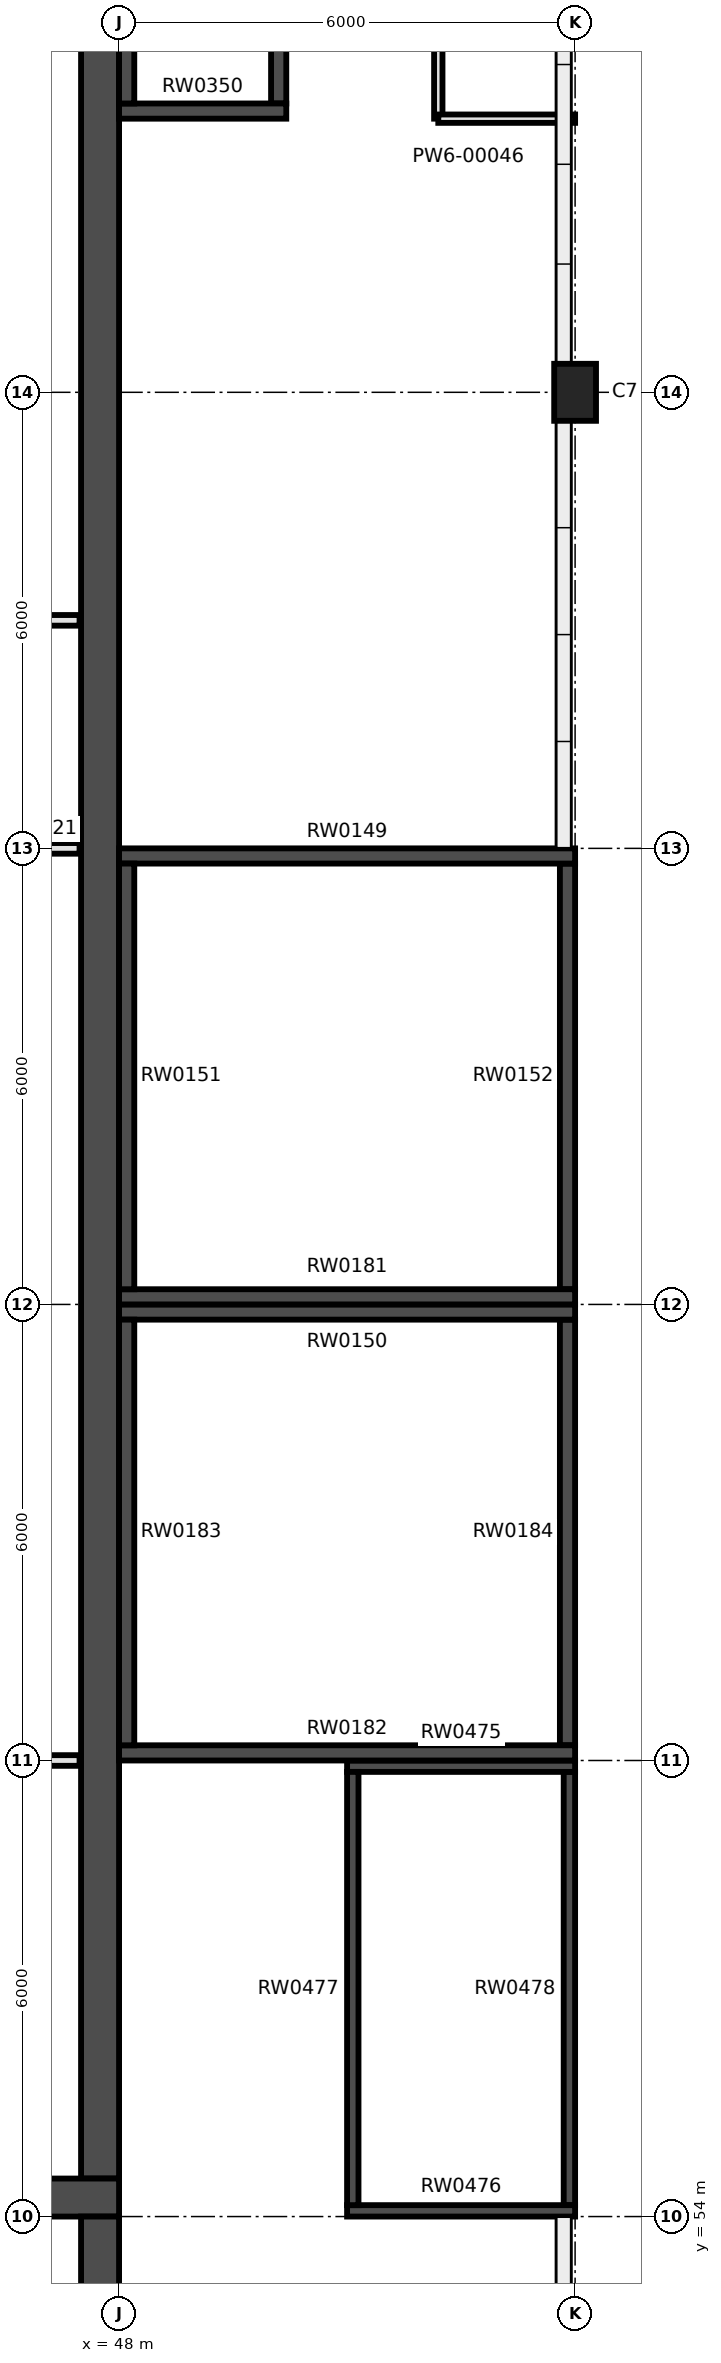
"""IFC4 building model, lengths in metres.
Left out: names, types, materials, properties, quantities, classifications, styles, units other than length and angle.
Written with IfcOpenShell. Run it as: python <this file> out.ifc"""

import sys

from ifc_helpers import new_model, si_unit, direction, frame, frame_2d, origin, origin_2d, place, context, subcontext, project, spatial, rectangle, extrude, element, fill, save


model = new_model("IFC4")
c1 = context("Model", 3, precision=1e-05, world=origin(), true_north=direction((0.0, 1.0)))
c2 = subcontext(c1, "Body", "Model", "MODEL_VIEW")
j1 = project(units=[si_unit("LENGTHUNIT", "METRE"), si_unit("PLANEANGLEUNIT", "RADIAN")], contexts=[c1])
p1 = place(None, origin())
s1 = spatial("IfcSite", under=j1, at=p1, CompositionType="ELEMENT")
p2 = place(p1, origin())
s2 = spatial("IfcBuilding", under=s1, at=p2, CompositionType="ELEMENT")
p3 = place(p2, origin())
s3 = spatial("IfcBuildingStorey", under=s2, at=p3, CompositionType="ELEMENT", Elevation=0.0)
p4 = place(p3, frame((54.0, 78.0, -0.3), z_axis=(0.0, 0.0, 1.0), x_axis=(1.0, 0.0, 0.0)))
e1 = element("IfcColumn", 1, at=p4, inside=s3, PredefinedType="COLUMN", context=c2, shape_type="SweptSolid", body=[
    extrude(rectangle(XDim=0.55, YDim=0.75, at=origin_2d()), origin(), (0.0, 0.0, 1.0), 7.3),
])
p5 = place(p3, frame((48.0, 71.9, -0.3), z_axis=(0.0, 0.0, 1.0), x_axis=(1.0, 0.0, 0.0)))
e2 = element("IfcWall", 2, at=p5, inside=s3, PredefinedType="SHEAR", context=c2, shape_type="SweptSolid", body=[
    extrude(rectangle(XDim=6.0, YDim=0.2, at=frame_2d((3.0, 0.0))), origin(), (0.0, 0.0, 1.0), 7.3),
])
p6 = place(p5, frame((4.6, 0.0, 0.3)))
e3 = element("IfcOpeningElement", 3, at=p6, cuts=e2, PredefinedType="OPENING", context=c2, shape_type="SweptSolid", body=[
    extrude(rectangle(XDim=1.1, YDim=2.2, at=frame_2d((0.55, 1.1))), frame((0.0, 0.11, 0.0), z_axis=(0.0, -1.0, 0.0), x_axis=(1.0, 0.0, 0.0)), (0.0, 0.0, 1.0), 0.22),
])
p7 = place(p3, frame((48.0, 66.1, -0.3), z_axis=(0.0, 0.0, 1.0), x_axis=(1.0, 0.0, 0.0)))
e4 = element("IfcWall", 4, at=p7, inside=s3, PredefinedType="SHEAR", context=c2, shape_type="SweptSolid", body=[
    extrude(rectangle(XDim=6.0, YDim=0.2, at=frame_2d((3.0, 0.0))), origin(), (0.0, 0.0, 1.0), 7.3),
])
p8 = place(p3, frame((48.1, 66.2, -0.3), z_axis=(0.0, 0.0, 1.0), x_axis=(0.0, 1.0, 0.0)))
e5 = element("IfcWall", 5, at=p8, inside=s3, PredefinedType="SHEAR", context=c2, shape_type="SweptSolid", body=[
    extrude(rectangle(XDim=5.6, YDim=0.2, at=frame_2d((2.8, 0.0))), origin(), (0.0, 0.0, 1.0), 7.3),
])
p9 = place(p3, frame((53.9, 66.2, -0.3), z_axis=(0.0, 0.0, 1.0), x_axis=(0.0, 1.0, 0.0)))
e6 = element("IfcWall", 6, at=p9, inside=s3, PredefinedType="SHEAR", context=c2, shape_type="SweptSolid", body=[
    extrude(rectangle(XDim=5.6, YDim=0.2, at=frame_2d((2.8, 0.0))), origin(), (0.0, 0.0, 1.0), 7.3),
])
p10 = place(p9, frame((1.9, 0.0, 0.3)))
e7 = element("IfcOpeningElement", 7, at=p10, cuts=e6, PredefinedType="OPENING", context=c2, shape_type="SweptSolid", body=[
    extrude(rectangle(XDim=1.8, YDim=2.4, at=frame_2d((0.9, 1.2))), frame((0.0, 0.11, 0.0), z_axis=(0.0, -1.0, 0.0), x_axis=(1.0, 0.0, 0.0)), (0.0, 0.0, 1.0), 0.22),
])
p11 = place(p3, frame((48.0, 65.9, -0.3), z_axis=(0.0, 0.0, 1.0), x_axis=(1.0, 0.0, 0.0)))
e8 = element("IfcWall", 8, at=p11, inside=s3, PredefinedType="SHEAR", context=c2, shape_type="SweptSolid", body=[
    extrude(rectangle(XDim=6.0, YDim=0.2, at=frame_2d((3.0, 0.0))), origin(), (0.0, 0.0, 1.0), 7.3),
])
p12 = place(p3, frame((48.0, 60.1, -0.3), z_axis=(0.0, 0.0, 1.0), x_axis=(1.0, 0.0, 0.0)))
e9 = element("IfcWall", 9, at=p12, inside=s3, PredefinedType="SHEAR", context=c2, shape_type="SweptSolid", body=[
    extrude(rectangle(XDim=6.0, YDim=0.2, at=frame_2d((3.0, 0.0))), origin(), (0.0, 0.0, 1.0), 7.3),
])
p13 = place(p12, frame((0.825, 0.0, 0.3)))
e10 = element("IfcOpeningElement", 10, at=p13, cuts=e9, PredefinedType="OPENING", context=c2, shape_type="SweptSolid", body=[
    extrude(rectangle(XDim=1.8, YDim=2.2, at=frame_2d((0.9, 1.1))), frame((0.0, 0.11, 0.0), z_axis=(0.0, -1.0, 0.0), x_axis=(1.0, 0.0, 0.0)), (0.0, 0.0, 1.0), 0.22),
])
p14 = place(p3, frame((48.1, 60.2, -0.3), z_axis=(0.0, 0.0, 1.0), x_axis=(0.0, 1.0, 0.0)))
e11 = element("IfcWall", 11, at=p14, inside=s3, PredefinedType="SHEAR", context=c2, shape_type="SweptSolid", body=[
    extrude(rectangle(XDim=5.6, YDim=0.2, at=frame_2d((2.8, 0.0))), origin(), (0.0, 0.0, 1.0), 7.3),
])
p15 = place(p3, frame((53.9, 60.2, -0.3), z_axis=(0.0, 0.0, 1.0), x_axis=(0.0, 1.0, 0.0)))
e12 = element("IfcWall", 12, at=p15, inside=s3, PredefinedType="SHEAR", context=c2, shape_type="SweptSolid", body=[
    extrude(rectangle(XDim=5.6, YDim=0.2, at=frame_2d((2.8, 0.0))), origin(), (0.0, 0.0, 1.0), 7.3),
])
p16 = place(p15, frame((0.125, 0.0, 0.3)))
e13 = element("IfcOpeningElement", 13, at=p16, cuts=e12, PredefinedType="OPENING", context=c2, shape_type="SweptSolid", body=[
    extrude(rectangle(XDim=1.8, YDim=2.4, at=frame_2d((0.9, 1.2))), frame((0.0, 0.11, 0.0), z_axis=(0.0, -1.0, 0.0), x_axis=(1.0, 0.0, 0.0)), (0.0, 0.0, 1.0), 0.22),
])
p17 = place(p3, frame((48.0, 81.7, -1.4), z_axis=(0.0, 0.0, 1.0), x_axis=(1.0, 0.0, 0.0)))
e14 = element("IfcWall", 14, at=p17, inside=s3, PredefinedType="SHEAR", context=c2, shape_type="SweptSolid", body=[
    extrude(rectangle(XDim=2.2, YDim=0.2, at=frame_2d((1.1, 0.0))), origin(), (0.0, 0.0, 1.0), 8.4),
])
p18 = place(p17, frame((0.55, 0.0, 1.4)))
e15 = element("IfcOpeningElement", 15, at=p18, cuts=e14, PredefinedType="OPENING", context=c2, shape_type="SweptSolid", body=[
    extrude(rectangle(XDim=1.1, YDim=2.1, at=frame_2d((0.55, 1.05))), frame((0.0, 0.11, 0.0), z_axis=(0.0, -1.0, 0.0), x_axis=(1.0, 0.0, 0.0)), (0.0, 0.0, 1.0), 0.22),
])
for number, where, z_axis, x_axis in (
    (16, (48.1, 81.8, -1.4), (0.0, 0.0, 1.0), (0.0, 1.0, 0.0)),
    (17, (50.1, 81.8, -1.4), (0.0, 0.0, 1.0), (0.0, 1.0, 0.0)),
):
    element("IfcWall", number, at=place(p3, frame(where, z_axis=z_axis, x_axis=x_axis)), inside=s3, PredefinedType="SHEAR", context=c2, shape_type="SweptSolid", body=[
        extrude(rectangle(XDim=2.0, YDim=0.2, at=frame_2d((1.0, 0.0))), origin(), (0.0, 0.0, 1.0), 8.4),
    ])
for number, where, z_axis, x_axis in (
    (18, (51.0, 59.925, -0.3), (0.0, 0.0, 1.0), (1.0, 0.0, 0.0)),
    (19, (51.0, 54.075, -0.3), (0.0, 0.0, 1.0), (1.0, 0.0, 0.0)),
):
    element("IfcWall", number, at=place(p3, frame(where, z_axis=z_axis, x_axis=x_axis)), inside=s3, PredefinedType="SHEAR", context=c2, shape_type="SweptSolid", body=[
        extrude(rectangle(XDim=3.0, YDim=0.15, at=frame_2d((1.5, 0.0))), origin(), (0.0, 0.0, 1.0), 7.3),
    ])
p19 = place(p3, frame((51.075, 54.15, -0.3), z_axis=(0.0, 0.0, 1.0), x_axis=(0.0, 1.0, 0.0)))
e20 = element("IfcWall", 20, at=p19, inside=s3, PredefinedType="SHEAR", context=c2, shape_type="SweptSolid", body=[
    extrude(rectangle(XDim=5.7, YDim=0.15, at=frame_2d((2.85, 0.0))), origin(), (0.0, 0.0, 1.0), 7.3),
])
p20 = place(p19, frame((2.5, 0.0, 0.3)))
e21 = element("IfcOpeningElement", 21, at=p20, cuts=e20, PredefinedType="OPENING", context=c2, shape_type="SweptSolid", body=[
    extrude(rectangle(XDim=0.6, YDim=2.04, at=frame_2d((0.3, 1.02))), frame((0.0, 0.085, 0.0), z_axis=(0.0, -1.0, 0.0), x_axis=(1.0, 0.0, 0.0)), (0.0, 0.0, 1.0), 0.17),
])
p21 = place(p3, frame((53.925, 54.15, -0.3), z_axis=(0.0, 0.0, 1.0), x_axis=(0.0, 1.0, 0.0)))
e22 = element("IfcWall", 22, at=p21, inside=s3, PredefinedType="SHEAR", context=c2, shape_type="SweptSolid", body=[
    extrude(rectangle(XDim=5.7, YDim=0.15, at=frame_2d((2.85, 0.0))), origin(), (0.0, 0.0, 1.0), 7.3),
])
p22 = place(p3, frame((47.75, 54.5, -0.3), z_axis=(0.0, 0.0, 1.0), x_axis=(0.0, 1.0, 0.0)))
e23 = element("IfcWall", 23, at=p22, inside=s3, PredefinedType="SHEAR", context=c2, shape_type="SweptSolid", body=[
    extrude(rectangle(XDim=35.5, YDim=0.5, at=frame_2d((17.75, 0.0))), origin(), (0.0, 0.0, 1.0), 7.3),
])
p23 = place(p22, frame((18.05, 0.0, 0.3)))
e24 = element("IfcOpeningElement", 24, at=p23, cuts=e23, PredefinedType="OPENING", context=c2, shape_type="SweptSolid", body=[
    extrude(rectangle(XDim=1.8, YDim=2.1, at=frame_2d((0.9, 1.05))), frame((0.0, 0.26, 0.0), z_axis=(0.0, -1.0, 0.0), x_axis=(1.0, 0.0, 0.0)), (0.0, 0.0, 1.0), 0.52),
])
p24 = place(p22, frame((3.6, 0.0, 0.3)))
e25 = element("IfcOpeningElement", 25, at=p24, cuts=e23, PredefinedType="OPENING", context=c2, shape_type="SweptSolid", body=[
    extrude(rectangle(XDim=1.0, YDim=2.1, at=frame_2d((0.5, 1.05))), frame((0.0, 0.26, 0.0), z_axis=(0.0, -1.0, 0.0), x_axis=(1.0, 0.0, 0.0)), (0.0, 0.0, 1.0), 0.52),
])
p25 = place(p3, frame((47.75, 30.0, -0.3), z_axis=(0.0, 0.0, 1.0), x_axis=(0.0, 1.0, 0.0)))
e26 = element("IfcWall", 26, at=p25, inside=s3, PredefinedType="SHEAR", context=c2, shape_type="SweptSolid", body=[
    extrude(rectangle(XDim=24.0, YDim=0.5, at=frame_2d((12.0, 0.0))), origin(), (0.0, 0.0, 1.0), 7.3),
])
p26 = place(p25, frame((2.25, 0.0, 0.3)))
e27 = element("IfcOpeningElement", 27, at=p26, cuts=e26, PredefinedType="OPENING", context=c2, shape_type="SweptSolid", body=[
    extrude(rectangle(XDim=1.5, YDim=2.1, at=frame_2d((0.75, 1.05))), frame((0.0, 0.26, 0.0), z_axis=(0.0, -1.0, 0.0), x_axis=(1.0, 0.0, 0.0)), (0.0, 0.0, 1.0), 0.52),
])
p27 = place(p25, frame((22.3, 0.0, 0.3)))
e28 = element("IfcOpeningElement", 28, at=p27, cuts=e26, PredefinedType="OPENING", context=c2, shape_type="SweptSolid", body=[
    extrude(rectangle(XDim=1.0, YDim=2.1, at=frame_2d((0.5, 1.05))), frame((0.0, 0.26, 0.0), z_axis=(0.0, -1.0, 0.0), x_axis=(1.0, 0.0, 0.0)), (0.0, 0.0, 1.0), 0.52),
])
p28 = place(p3, frame((18.0, 54.25, -0.3), z_axis=(0.0, 0.0, 1.0), x_axis=(1.0, 0.0, 0.0)))
e29 = element("IfcWall", 29, at=p28, inside=s3, PredefinedType="SHEAR", context=c2, shape_type="SweptSolid", body=[
    extrude(rectangle(XDim=30.0, YDim=0.5, at=frame_2d((15.0, 0.0))), origin(), (0.0, 0.0, 1.0), 7.3),
])
p29 = place(p3, frame((52.2, 81.6, 0.0), z_axis=(0.0, 0.0, 1.0), x_axis=(0.0, 1.0, 0.0)))
e30 = element("IfcWall", 30, at=p29, inside=s3, PredefinedType="PARTITIONING", context=c2, shape_type="SweptSolid", body=[
    extrude(rectangle(XDim=2.4, YDim=0.11, at=frame_2d((1.2, 0.0))), origin(), (0.0, 0.0, 1.0), 6.15),
])
p30 = place(p29, frame((0.85, 0.0, 0.0)))
e31 = element("IfcOpeningElement", 31, at=p30, cuts=e30, PredefinedType="OPENING", context=c2, shape_type="SweptSolid", body=[
    extrude(rectangle(XDim=0.75, YDim=2.04, at=frame_2d((0.375, 1.02))), frame((0.0, 0.065, 0.0), z_axis=(0.0, -1.0, 0.0), x_axis=(1.0, 0.0, 0.0)), (0.0, 0.0, 1.0), 0.13),
])
p31 = place(p3, frame((52.2, 81.6, 0.0), z_axis=(0.0, 0.0, 1.0), x_axis=(1.0, 0.0, 0.0)))
e32 = element("IfcWall", 32, at=p31, inside=s3, PredefinedType="PARTITIONING", context=c2, shape_type="SweptSolid", body=[
    extrude(rectangle(XDim=1.8, YDim=0.11, at=frame_2d((0.9, 0.0))), origin(), (0.0, 0.0, 1.0), 6.05),
])
p32 = place(p3, frame((18.52, 60.0, 0.0), z_axis=(0.0, 0.0, 1.0), x_axis=(1.0, 0.0, 0.0)))
e33 = element("IfcWall", 33, at=p32, inside=s3, PredefinedType="PARTITIONING", context=c2, shape_type="SweptSolid", body=[
    extrude(rectangle(XDim=28.96, YDim=0.14, at=frame_2d((14.48, 0.0))), origin(), (0.0, 0.0, 1.0), 2.964),
])
p33 = place(p3, frame((39.0, 72.0, 0.0), z_axis=(0.0, 0.0, 1.0), x_axis=(1.0, 0.0, 0.0)))
e34 = element("IfcWall", 34, at=p33, inside=s3, PredefinedType="PARTITIONING", context=c2, shape_type="SweptSolid", body=[
    extrude(rectangle(XDim=8.48, YDim=0.14, at=frame_2d((4.24, 0.0))), origin(), (0.0, 0.0, 1.0), 3.924),
])
p34 = place(p33, frame((3.95, 0.0, 0.0)))
e35 = element("IfcOpeningElement", 35, at=p34, cuts=e34, PredefinedType="OPENING", context=c2, shape_type="SweptSolid", body=[
    extrude(rectangle(XDim=1.0, YDim=2.1, at=frame_2d((0.5, 1.05))), frame((0.0, 0.08, 0.0), z_axis=(0.0, -1.0, 0.0), x_axis=(1.0, 0.0, 0.0)), (0.0, 0.0, 1.0), 0.16),
])
p35 = place(p3, frame((41.0, 75.0, 0.0), z_axis=(0.0, 0.0, 1.0), x_axis=(1.0, 0.0, 0.0)))
e36 = element("IfcWall", 36, at=p35, inside=s3, PredefinedType="PARTITIONING", context=c2, shape_type="SweptSolid", body=[
    extrude(rectangle(XDim=6.48, YDim=0.14, at=frame_2d((3.24, 0.0))), origin(), (0.0, 0.0, 1.0), 5.5),
])
p36 = place(p35, frame((2.95, 0.0, 0.0)))
e37 = element("IfcOpeningElement", 37, at=p36, cuts=e36, PredefinedType="OPENING", context=c2, shape_type="SweptSolid", body=[
    extrude(rectangle(XDim=1.0, YDim=2.1, at=frame_2d((0.5, 1.05))), frame((0.0, 0.08, 0.0), z_axis=(0.0, -1.0, 0.0), x_axis=(1.0, 0.0, 0.0)), (0.0, 0.0, 1.0), 0.16),
])
p37 = place(p10, frame((1.8, 0.0, 0.0), z_axis=(0.0, 0.0, 1.0), x_axis=(-1.0, 0.0, 0.0)))
e38 = element("IfcDoor", 38, at=p37, inside=s3, OperationType="DOUBLE_DOOR_SINGLE_SWING", PredefinedType="DOOR", context=c2, shape_type="SweptSolid", body=[
    extrude(rectangle(XDim=1.8, YDim=2.4, at=frame_2d((0.9, 1.2))), frame((0.0, 0.025, 0.0), z_axis=(0.0, -1.0, 0.0), x_axis=(1.0, 0.0, 0.0)), (0.0, 0.0, 1.0), 0.05),
])
fill(e7, e38)
p38 = place(p16, frame((1.8, 0.0, 0.0), z_axis=(0.0, 0.0, 1.0), x_axis=(-1.0, 0.0, 0.0)))
e39 = element("IfcDoor", 39, at=p38, inside=s3, OperationType="DOUBLE_DOOR_SINGLE_SWING", PredefinedType="DOOR", context=c2, shape_type="SweptSolid", body=[
    extrude(rectangle(XDim=1.8, YDim=2.4, at=frame_2d((0.9, 1.2))), frame((0.0, 0.025, 0.0), z_axis=(0.0, -1.0, 0.0), x_axis=(1.0, 0.0, 0.0)), (0.0, 0.0, 1.0), 0.05),
])
fill(e13, e39)
p39 = place(p6, frame((1.1, 0.0, 0.0), z_axis=(0.0, 0.0, 1.0), x_axis=(-1.0, 0.0, 0.0)))
e40 = element("IfcDoor", 40, at=p39, inside=s3, OperationType="SINGLE_SWING_RIGHT", PredefinedType="DOOR", context=c2, shape_type="SweptSolid", body=[
    extrude(rectangle(XDim=1.1, YDim=2.2, at=frame_2d((0.55, 1.1))), frame((0.0, 0.025, 0.0), z_axis=(0.0, -1.0, 0.0), x_axis=(1.0, 0.0, 0.0)), (0.0, 0.0, 1.0), 0.05),
])
fill(e3, e40)
p40 = place(p13, origin())
e41 = element("IfcDoor", 41, at=p40, inside=s3, OperationType="DOUBLE_DOOR_SINGLE_SWING", PredefinedType="DOOR", context=c2, shape_type="SweptSolid", body=[
    extrude(rectangle(XDim=1.8, YDim=2.2, at=frame_2d((0.9, 1.1))), frame((0.0, 0.025, 0.0), z_axis=(0.0, -1.0, 0.0), x_axis=(1.0, 0.0, 0.0)), (0.0, 0.0, 1.0), 0.05),
])
fill(e10, e41)
p41 = place(p30, frame((0.75, 0.0, 0.0), z_axis=(0.0, 0.0, 1.0), x_axis=(-1.0, 0.0, 0.0)))
e42 = element("IfcDoor", 42, at=p41, inside=s3, OperationType="SINGLE_SWING_LEFT", PredefinedType="DOOR", context=c2, shape_type="SweptSolid", body=[
    extrude(rectangle(XDim=0.75, YDim=2.04, at=frame_2d((0.375, 1.02))), frame((0.0, 0.025, 0.0), z_axis=(0.0, -1.0, 0.0), x_axis=(1.0, 0.0, 0.0)), (0.0, 0.0, 1.0), 0.05),
])
fill(e31, e42)
p42 = place(p20, frame((0.6, 0.0, 0.0), z_axis=(0.0, 0.0, 1.0), x_axis=(-1.0, 0.0, 0.0)))
e43 = element("IfcDoor", 43, at=p42, inside=s3, OperationType="SINGLE_SWING_LEFT", PredefinedType="DOOR", context=c2, shape_type="SweptSolid", body=[
    extrude(rectangle(XDim=0.6, YDim=2.04, at=frame_2d((0.3, 1.02))), frame((0.0, 0.025, 0.0), z_axis=(0.0, -1.0, 0.0), x_axis=(1.0, 0.0, 0.0)), (0.0, 0.0, 1.0), 0.05),
])
fill(e21, e43)
p43 = place(p23, origin())
e44 = element("IfcDoor", 44, at=p43, inside=s3, OperationType="DOUBLE_DOOR_SINGLE_SWING", PredefinedType="DOOR", context=c2, shape_type="SweptSolid", body=[
    extrude(rectangle(XDim=1.8, YDim=2.1, at=frame_2d((0.9, 1.05))), frame((0.0, 0.025, 0.0), z_axis=(0.0, -1.0, 0.0), x_axis=(1.0, 0.0, 0.0)), (0.0, 0.0, 1.0), 0.05),
])
fill(e24, e44)
p44 = place(p24, frame((1.0, 0.0, 0.0), z_axis=(0.0, 0.0, 1.0), x_axis=(-1.0, 0.0, 0.0)))
e45 = element("IfcDoor", 45, at=p44, inside=s3, OperationType="SINGLE_SWING_LEFT", PredefinedType="DOOR", context=c2, shape_type="SweptSolid", body=[
    extrude(rectangle(XDim=1.0, YDim=2.1, at=frame_2d((0.5, 1.05))), frame((0.0, 0.025, 0.0), z_axis=(0.0, -1.0, 0.0), x_axis=(1.0, 0.0, 0.0)), (0.0, 0.0, 1.0), 0.05),
])
fill(e25, e45)
p45 = place(p27, frame((1.0, 0.0, 0.0), z_axis=(0.0, 0.0, 1.0), x_axis=(-1.0, 0.0, 0.0)))
e46 = element("IfcDoor", 46, at=p45, inside=s3, OperationType="SINGLE_SWING_LEFT", PredefinedType="DOOR", context=c2, shape_type="SweptSolid", body=[
    extrude(rectangle(XDim=1.0, YDim=2.1, at=frame_2d((0.5, 1.05))), frame((0.0, 0.025, 0.0), z_axis=(0.0, -1.0, 0.0), x_axis=(1.0, 0.0, 0.0)), (0.0, 0.0, 1.0), 0.05),
])
fill(e28, e46)
p46 = place(p18, origin())
e47 = element("IfcDoor", 47, at=p46, inside=s3, OperationType="DOUBLE_DOOR_SLIDING", PredefinedType="DOOR", context=c2, shape_type="SweptSolid", body=[
    extrude(rectangle(XDim=1.1, YDim=2.1, at=frame_2d((0.55, 1.05))), frame((0.0, 0.025, 0.0), z_axis=(0.0, -1.0, 0.0), x_axis=(1.0, 0.0, 0.0)), (0.0, 0.0, 1.0), 0.05),
])
fill(e15, e47)
save(model, sys.argv[1])
